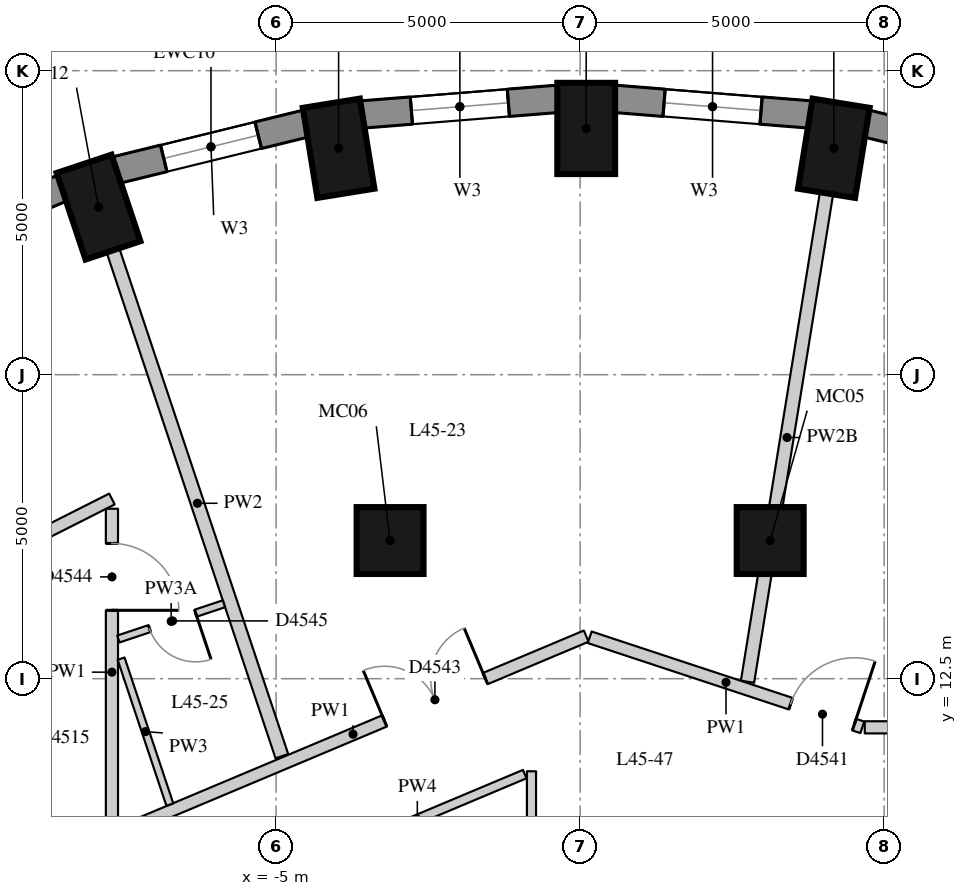
"""IFC4 building model, lengths in metres.
Left out: names, types, materials, properties, quantities, classifications, styles, units other than length and angle.
Written with IfcOpenShell. Run it as: python <this file> out.ifc"""

import sys

from ifc_helpers import new_model, si_unit, direction, frame, frame_2d, origin, origin_2d, place, context, subcontext, project, spatial, rectangle, extrude, element, fill, save


model = new_model("IFC4")
c1 = context("Model", 3, precision=1e-05, world=origin(), true_north=direction((0.0, 1.0)))
c2 = subcontext(c1, "Body", "Model", "MODEL_VIEW")
j1 = project(units=[si_unit("LENGTHUNIT", "METRE"), si_unit("PLANEANGLEUNIT", "RADIAN")], contexts=[c1])
p1 = place(None, origin())
s1 = spatial("IfcSite", under=j1, at=p1, CompositionType="ELEMENT")
p2 = place(p1, origin())
s2 = spatial("IfcBuilding", under=s1, at=p2, CompositionType="ELEMENT")
p3 = place(p2, frame((0.0, 0.0, 161.6)))
s3 = spatial("IfcBuildingStorey", under=s2, at=p3, CompositionType="ELEMENT", Elevation=161.6)
for number, where, z_axis, x_axis in (
    (1, (4.172, 21.224, 0.0), (0.0, 0.0, 1.0), (0.16, 0.987, 0.0)),
    (2, (0.1, 21.55, 0.0), (0.0, 0.0, 1.0), (0.0, 1.0, 0.0)),
    (3, (-3.972, 21.224, 0.0), (0.0, 0.0, 1.0), (-0.16, 0.987, 0.0)),
    (4, (-7.92, 20.256, 0.0), (0.0, 0.0, 1.0), (-0.317, 0.949, 0.0)),
):
    element("IfcColumn", number, at=place(p3, frame(where, z_axis=z_axis, x_axis=x_axis)), inside=s3, PredefinedType="COLUMN", context=c2, shape_type="SweptSolid", body=[
        extrude(rectangle(XDim=1.5, YDim=0.95, at=origin_2d()), origin(), (0.0, 0.0, 1.0), 3.3),
    ])
for number, where, z_axis, x_axis in (
    (5, (3.126, 14.772, 0.0), (0.0, 0.0, 1.0), (1.0, 0.0, 0.0)),
    (6, (-3.126, 14.772, 0.0), (0.0, 0.0, 1.0), (1.0, 0.0, 0.0)),
):
    element("IfcColumn", number, at=place(p3, frame(where, z_axis=z_axis, x_axis=x_axis)), inside=s3, PredefinedType="COLUMN", context=c2, shape_type="SweptSolid", body=[
        extrude(rectangle(XDim=1.1, YDim=1.1, at=origin_2d()), origin(), (0.0, 0.0, 1.0), 3.3),
    ])
p4 = place(p3, frame((7.843, 20.862, 0.0), z_axis=(0.0, 0.0, 1.0), x_axis=(-0.971237178372, 0.238114139328, 0.0)))
e7 = element("IfcWall", 7, at=p4, inside=s3, PredefinedType="SOLIDWALL", context=c2, shape_type="SweptSolid", body=[
    extrude(rectangle(XDim=3.237, YDim=0.45, at=frame_2d((1.618, 0.0))), origin(), (0.0, 0.0, 1.0), 3.02),
])
p5 = place(p4, frame((0.818, 0.0, 0.4)))
e8 = element("IfcOpeningElement", 8, at=p5, cuts=e7, PredefinedType="OPENING", context=c2, shape_type="SweptSolid", body=[
    extrude(rectangle(XDim=1.6, YDim=1.75, at=frame_2d((0.8, 0.875))), frame((0.0, 0.235, 0.0), z_axis=(0.0, -1.0, 0.0), x_axis=(1.0, 0.0, 0.0)), (0.0, 0.0, 1.0), 0.47),
])
p6 = place(p3, frame((3.801, 21.778, 0.0), z_axis=(0.0, 0.0, 1.0), x_axis=(-0.996812416891, 0.079780984773, 0.0)))
e9 = element("IfcWall", 9, at=p6, inside=s3, PredefinedType="SOLIDWALL", context=c2, shape_type="SweptSolid", body=[
    extrude(rectangle(XDim=3.256, YDim=0.45, at=frame_2d((1.628, 0.0))), origin(), (0.0, 0.0, 1.0), 3.02),
])
p7 = place(p6, frame((0.828, 0.0, 0.4)))
e10 = element("IfcOpeningElement", 10, at=p7, cuts=e9, PredefinedType="OPENING", context=c2, shape_type="SweptSolid", body=[
    extrude(rectangle(XDim=1.6, YDim=1.75, at=frame_2d((0.8, 0.875))), frame((0.0, 0.235, 0.0), z_axis=(0.0, -1.0, 0.0), x_axis=(1.0, 0.0, 0.0)), (0.0, 0.0, 1.0), 0.47),
])
p8 = place(p3, frame((-0.355, 22.038, 0.0), z_axis=(0.0, 0.0, 1.0), x_axis=(-0.996812416891, -0.079780984773, 0.0)))
e11 = element("IfcWall", 11, at=p8, inside=s3, PredefinedType="SOLIDWALL", context=c2, shape_type="SweptSolid", body=[
    extrude(rectangle(XDim=3.256, YDim=0.45, at=frame_2d((1.628, 0.0))), origin(), (0.0, 0.0, 1.0), 3.02),
])
p9 = place(p8, frame((0.828, 0.0, 0.4)))
e12 = element("IfcOpeningElement", 12, at=p9, cuts=e11, PredefinedType="OPENING", context=c2, shape_type="SweptSolid", body=[
    extrude(rectangle(XDim=1.6, YDim=1.75, at=frame_2d((0.8, 0.875))), frame((0.0, 0.235, 0.0), z_axis=(0.0, -1.0, 0.0), x_axis=(1.0, 0.0, 0.0)), (0.0, 0.0, 1.0), 0.47),
])
p10 = place(p3, frame((-4.499, 21.633, 0.0), z_axis=(0.0, 0.0, 1.0), x_axis=(-0.971232901476, -0.238131583563, 0.0)))
e13 = element("IfcWall", 13, at=p10, inside=s3, PredefinedType="SOLIDWALL", context=c2, shape_type="SweptSolid", body=[
    extrude(rectangle(XDim=3.237, YDim=0.45, at=frame_2d((1.618, 0.0))), origin(), (0.0, 0.0, 1.0), 3.02),
])
p11 = place(p10, frame((0.818, 0.0, 0.4)))
e14 = element("IfcOpeningElement", 14, at=p11, cuts=e13, PredefinedType="OPENING", context=c2, shape_type="SweptSolid", body=[
    extrude(rectangle(XDim=1.6, YDim=1.75, at=frame_2d((0.8, 0.875))), frame((0.0, 0.235, 0.0), z_axis=(0.0, -1.0, 0.0), x_axis=(1.0, 0.0, 0.0)), (0.0, 0.0, 1.0), 0.47),
])
p12 = place(p3, frame((-8.506, 20.574, 0.0), z_axis=(0.0, 0.0, 1.0), x_axis=(-0.919798725687, -0.392390499663, 0.0)))
e15 = element("IfcWall", 15, at=p12, inside=s3, PredefinedType="SOLIDWALL", context=c2, shape_type="SweptSolid", body=[
    extrude(rectangle(XDim=3.2, YDim=0.45, at=frame_2d((1.6, 0.0))), origin(), (0.0, 0.0, 1.0), 3.02),
])
p13 = place(p12, frame((0.8, 0.0, 0.4)))
e16 = element("IfcOpeningElement", 16, at=p13, cuts=e15, PredefinedType="OPENING", context=c2, shape_type="SweptSolid", body=[
    extrude(rectangle(XDim=1.6, YDim=1.75, at=frame_2d((0.8, 0.875))), frame((0.0, 0.235, 0.0), z_axis=(0.0, -1.0, 0.0), x_axis=(1.0, 0.0, 0.0)), (0.0, 0.0, 1.0), 0.47),
])
p14 = place(p3, frame((-10.416, 14.082, 0.0), z_axis=(0.0, 0.0, 1.0), x_axis=(0.892396808139, 0.451251522793, 0.0)))
e17 = element("IfcWall", 17, at=p14, inside=s3, PredefinedType="PARTITIONING", context=c2, shape_type="SweptSolid", body=[
    extrude(rectangle(XDim=3.044, YDim=0.2, at=frame_2d((1.522, 0.0))), origin(), (0.0, 0.0, 1.0), 3.02),
])
p15 = place(p3, frame((-7.7, 15.295, 0.0), z_axis=(0.0, 0.0, 1.0), x_axis=(0.0, -1.0, 0.0)))
e18 = element("IfcWall", 18, at=p15, inside=s3, PredefinedType="PARTITIONING", context=c2, shape_type="SweptSolid", body=[
    extrude(rectangle(XDim=5.375, YDim=0.2, at=frame_2d((2.688, 0.0))), origin(), (0.0, 0.0, 1.0), 3.02),
])
p16 = place(p15, frame((0.57, 0.0, 0.0)))
e19 = element("IfcOpeningElement", 19, at=p16, cuts=e18, PredefinedType="OPENING", context=c2, shape_type="SweptSolid", body=[
    extrude(rectangle(XDim=1.1, YDim=2.1, at=frame_2d((0.55, 1.05))), frame((0.0, 0.11, 0.0), z_axis=(0.0, -1.0, 0.0), x_axis=(1.0, 0.0, 0.0)), (0.0, 0.0, 1.0), 0.22),
])
p17 = place(p3, frame((-7.57, 9.975, 0.0), z_axis=(0.0, 0.0, 1.0), x_axis=(0.921815879705, 0.387628022624, 0.0)))
e20 = element("IfcWall", 20, at=p17, inside=s3, PredefinedType="PARTITIONING", context=c2, shape_type="SweptSolid", body=[
    extrude(rectangle(XDim=8.321, YDim=0.2, at=frame_2d((4.16, 0.0))), origin(), (0.0, 0.0, 1.0), 3.02),
])
p18 = place(p17, frame((4.721, 0.0, 0.0)))
e21 = element("IfcOpeningElement", 21, at=p18, cuts=e20, PredefinedType="OPENING", context=c2, shape_type="SweptSolid", body=[
    extrude(rectangle(XDim=1.8, YDim=2.1, at=frame_2d((0.9, 1.05))), frame((0.0, 0.11, 0.0), z_axis=(0.0, -1.0, 0.0), x_axis=(1.0, 0.0, 0.0)), (0.0, 0.0, 1.0), 0.22),
])
p19 = place(p3, frame((0.157, 13.181, 0.0), z_axis=(0.0, 0.0, 1.0), x_axis=(0.949543217684, -0.313636218811, 0.0)))
e22 = element("IfcWall", 22, at=p19, inside=s3, PredefinedType="PARTITIONING", context=c2, shape_type="SweptSolid", body=[
    extrude(rectangle(XDim=4.722, YDim=0.2, at=frame_2d((2.361, 0.0))), origin(), (0.0, 0.0, 1.0), 3.02),
])
p20 = place(p19, frame((3.482, 0.0, 0.0)))
e23 = element("IfcOpeningElement", 23, at=p20, cuts=e22, PredefinedType="OPENING", context=c2, shape_type="SweptSolid", body=[
    extrude(rectangle(XDim=1.1, YDim=2.1, at=frame_2d((0.55, 1.05))), frame((0.0, 0.11, 0.0), z_axis=(0.0, -1.0, 0.0), x_axis=(1.0, 0.0, 0.0)), (0.0, 0.0, 1.0), 0.22),
])
p21 = place(p3, frame((4.681, 11.7, 0.0), z_axis=(0.0, 0.0, 1.0), x_axis=(1.0, 0.0, 0.0)))
e24 = element("IfcWall", 24, at=p21, inside=s3, PredefinedType="PARTITIONING", context=c2, shape_type="SweptSolid", body=[
    extrude(rectangle(XDim=13.019, YDim=0.2, at=frame_2d((6.51, 0.0))), origin(), (0.0, 0.0, 1.0), 3.02),
])
p22 = place(p21, frame((4.662, 0.0, 0.0)))
e25 = element("IfcOpeningElement", 25, at=p22, cuts=e24, PredefinedType="OPENING", context=c2, shape_type="SweptSolid", body=[
    extrude(rectangle(XDim=0.9, YDim=2.1, at=frame_2d((0.45, 1.05))), frame((0.0, 0.11, 0.0), z_axis=(0.0, -1.0, 0.0), x_axis=(1.0, 0.0, 0.0)), (0.0, 0.0, 1.0), 0.22),
])
p23 = place(p21, frame((8.99, 0.0, 0.0)))
e26 = element("IfcOpeningElement", 26, at=p23, cuts=e24, PredefinedType="OPENING", context=c2, shape_type="SweptSolid", body=[
    extrude(rectangle(XDim=1.8, YDim=2.1, at=frame_2d((0.9, 1.05))), frame((0.0, 0.11, 0.0), z_axis=(0.0, -1.0, 0.0), x_axis=(1.0, 0.0, 0.0)), (0.0, 0.0, 1.0), 0.22),
])
p24 = place(p3, frame((-0.8, 10.977, 0.0), z_axis=(0.0, 0.0, 1.0), x_axis=(0.0, -1.0, 0.0)))
e27 = element("IfcWall", 27, at=p24, inside=s3, PredefinedType="PARTITIONING", context=c2, shape_type="SweptSolid", body=[
    extrude(rectangle(XDim=5.308, YDim=0.15, at=frame_2d((2.654, 0.0))), origin(), (0.0, 0.0, 1.0), 3.02),
])
p25 = place(p24, frame((2.204, 0.0, 0.0)))
e28 = element("IfcOpeningElement", 28, at=p25, cuts=e27, PredefinedType="OPENING", context=c2, shape_type="SweptSolid", body=[
    extrude(rectangle(XDim=0.9, YDim=2.1, at=frame_2d((0.45, 1.05))), frame((0.0, 0.085, 0.0), z_axis=(0.0, -1.0, 0.0), x_axis=(1.0, 0.0, 0.0)), (0.0, 0.0, 1.0), 0.17),
])
p26 = place(p3, frame((-4.444, 9.445, 0.0), z_axis=(0.0, 0.0, 1.0), x_axis=(0.921822351054, 0.387612632788, 0.0)))
e29 = element("IfcWall", 29, at=p26, inside=s3, PredefinedType="PARTITIONING", context=c2, shape_type="SweptSolid", body=[
    extrude(rectangle(XDim=3.832, YDim=0.15, at=frame_2d((1.916, 0.0))), origin(), (0.0, 0.0, 1.0), 3.02),
])
p27 = place(p3, frame((4.052, 20.484, 0.0), z_axis=(0.0, 0.0, 1.0), x_axis=(-0.159683255106, -0.987168302793, 0.0)))
e30 = element("IfcWall", 30, at=p27, inside=s3, PredefinedType="PARTITIONING", context=c2, shape_type="SweptSolid", body=[
    extrude(rectangle(XDim=8.138, YDim=0.22, at=frame_2d((4.069, 0.0))), origin(), (0.0, 0.0, 1.0), 2.57),
])
p28 = place(p3, frame((-7.683, 19.545, 0.0), z_axis=(0.0, 0.0, 1.0), x_axis=(0.316703700313, -0.948524520615, 0.0)))
e31 = element("IfcWall", 31, at=p28, inside=s3, PredefinedType="PARTITIONING", context=c2, shape_type="SweptSolid", body=[
    extrude(rectangle(XDim=8.771, YDim=0.22, at=frame_2d((4.385, 0.0))), origin(), (0.0, 0.0, 1.0), 3.02),
])
p29 = place(p3, frame((-6.748, 10.429, 0.0), z_axis=(0.0, 0.0, 1.0), x_axis=(-0.316690754737, 0.948528842927, 0.0)))
e32 = element("IfcWall", 32, at=p29, inside=s3, PredefinedType="PARTITIONING", context=c2, shape_type="SweptSolid", body=[
    extrude(rectangle(XDim=2.531, YDim=0.12, at=frame_2d((1.266, 0.0))), origin(), (0.0, 0.0, 1.0), 3.02),
])
p30 = place(p3, frame((-7.594, 13.153, 0.0), z_axis=(0.0, 0.0, 1.0), x_axis=(0.948563158378, 0.316587957079, 0.0)))
e33 = element("IfcWall", 33, at=p30, inside=s3, PredefinedType="PARTITIONING", context=c2, shape_type="SweptSolid", body=[
    extrude(rectangle(XDim=1.83, YDim=0.12, at=frame_2d((0.915, 0.0))), origin(), (0.0, 0.0, 1.0), 2.57),
])
p31 = place(p30, frame((0.54, 0.0, 0.0)))
e34 = element("IfcOpeningElement", 34, at=p31, cuts=e33, PredefinedType="OPENING", context=c2, shape_type="SweptSolid", body=[
    extrude(rectangle(XDim=0.8, YDim=2.1, at=frame_2d((0.4, 1.05))), frame((0.0, 0.07, 0.0), z_axis=(0.0, -1.0, 0.0), x_axis=(1.0, 0.0, 0.0)), (0.0, 0.0, 1.0), 0.14),
])
p32 = place(p7, origin())
e35 = element("IfcWindow", 35, at=p32, inside=s3, PartitioningType="SINGLE_PANEL", PredefinedType="WINDOW", context=c2, shape_type="SweptSolid", body=[
    extrude(rectangle(XDim=1.6, YDim=1.75, at=frame_2d((0.8, 0.875))), frame((0.0, 0.035, 0.0), z_axis=(0.0, -1.0, 0.0), x_axis=(1.0, 0.0, 0.0)), (0.0, 0.0, 1.0), 0.06),
])
fill(e10, e35)
p33 = place(p9, origin())
e36 = element("IfcWindow", 36, at=p33, inside=s3, PartitioningType="SINGLE_PANEL", PredefinedType="WINDOW", context=c2, shape_type="SweptSolid", body=[
    extrude(rectangle(XDim=1.6, YDim=1.75, at=frame_2d((0.8, 0.875))), frame((0.0, 0.035, 0.0), z_axis=(0.0, -1.0, 0.0), x_axis=(1.0, 0.0, 0.0)), (0.0, 0.0, 1.0), 0.06),
])
fill(e12, e36)
p34 = place(p11, origin())
e37 = element("IfcWindow", 37, at=p34, inside=s3, PartitioningType="SINGLE_PANEL", PredefinedType="WINDOW", context=c2, shape_type="SweptSolid", body=[
    extrude(rectangle(XDim=1.6, YDim=1.75, at=frame_2d((0.8, 0.875))), frame((0.0, 0.035, 0.0), z_axis=(0.0, -1.0, 0.0), x_axis=(1.0, 0.0, 0.0)), (0.0, 0.0, 1.0), 0.06),
])
fill(e14, e37)
p35 = place(p20, origin())
e38 = element("IfcDoor", 38, at=p35, inside=s3, OperationType="SINGLE_SWING_RIGHT", PredefinedType="DOOR", context=c2, shape_type="SweptSolid", body=[
    extrude(rectangle(XDim=1.1, YDim=2.1, at=frame_2d((0.55, 1.05))), frame((0.0, 0.025, 0.0), z_axis=(0.0, -1.0, 0.0), x_axis=(1.0, 0.0, 0.0)), (0.0, 0.0, 1.0), 0.05),
])
fill(e23, e38)
p36 = place(p18, origin())
e39 = element("IfcDoor", 39, at=p36, inside=s3, OperationType="DOUBLE_DOOR_SINGLE_SWING", PredefinedType="DOOR", context=c2, shape_type="SweptSolid", body=[
    extrude(rectangle(XDim=1.8, YDim=2.1, at=frame_2d((0.9, 1.05))), frame((0.0, 0.025, 0.0), z_axis=(0.0, -1.0, 0.0), x_axis=(1.0, 0.0, 0.0)), (0.0, 0.0, 1.0), 0.05),
])
fill(e21, e39)
p37 = place(p16, origin())
e40 = element("IfcDoor", 40, at=p37, inside=s3, OperationType="SINGLE_SWING_RIGHT", PredefinedType="DOOR", context=c2, shape_type="SweptSolid", body=[
    extrude(rectangle(XDim=1.1, YDim=2.1, at=frame_2d((0.55, 1.05))), frame((0.0, 0.025, 0.0), z_axis=(0.0, -1.0, 0.0), x_axis=(1.0, 0.0, 0.0)), (0.0, 0.0, 1.0), 0.05),
])
fill(e19, e40)
p38 = place(p31, origin())
e41 = element("IfcDoor", 41, at=p38, inside=s3, OperationType="SINGLE_SWING_LEFT", PredefinedType="DOOR", context=c2, shape_type="SweptSolid", body=[
    extrude(rectangle(XDim=0.8, YDim=2.1, at=frame_2d((0.4, 1.05))), frame((0.0, 0.025, 0.0), z_axis=(0.0, -1.0, 0.0), x_axis=(1.0, 0.0, 0.0)), (0.0, 0.0, 1.0), 0.05),
])
fill(e34, e41)
save(model, sys.argv[1])
